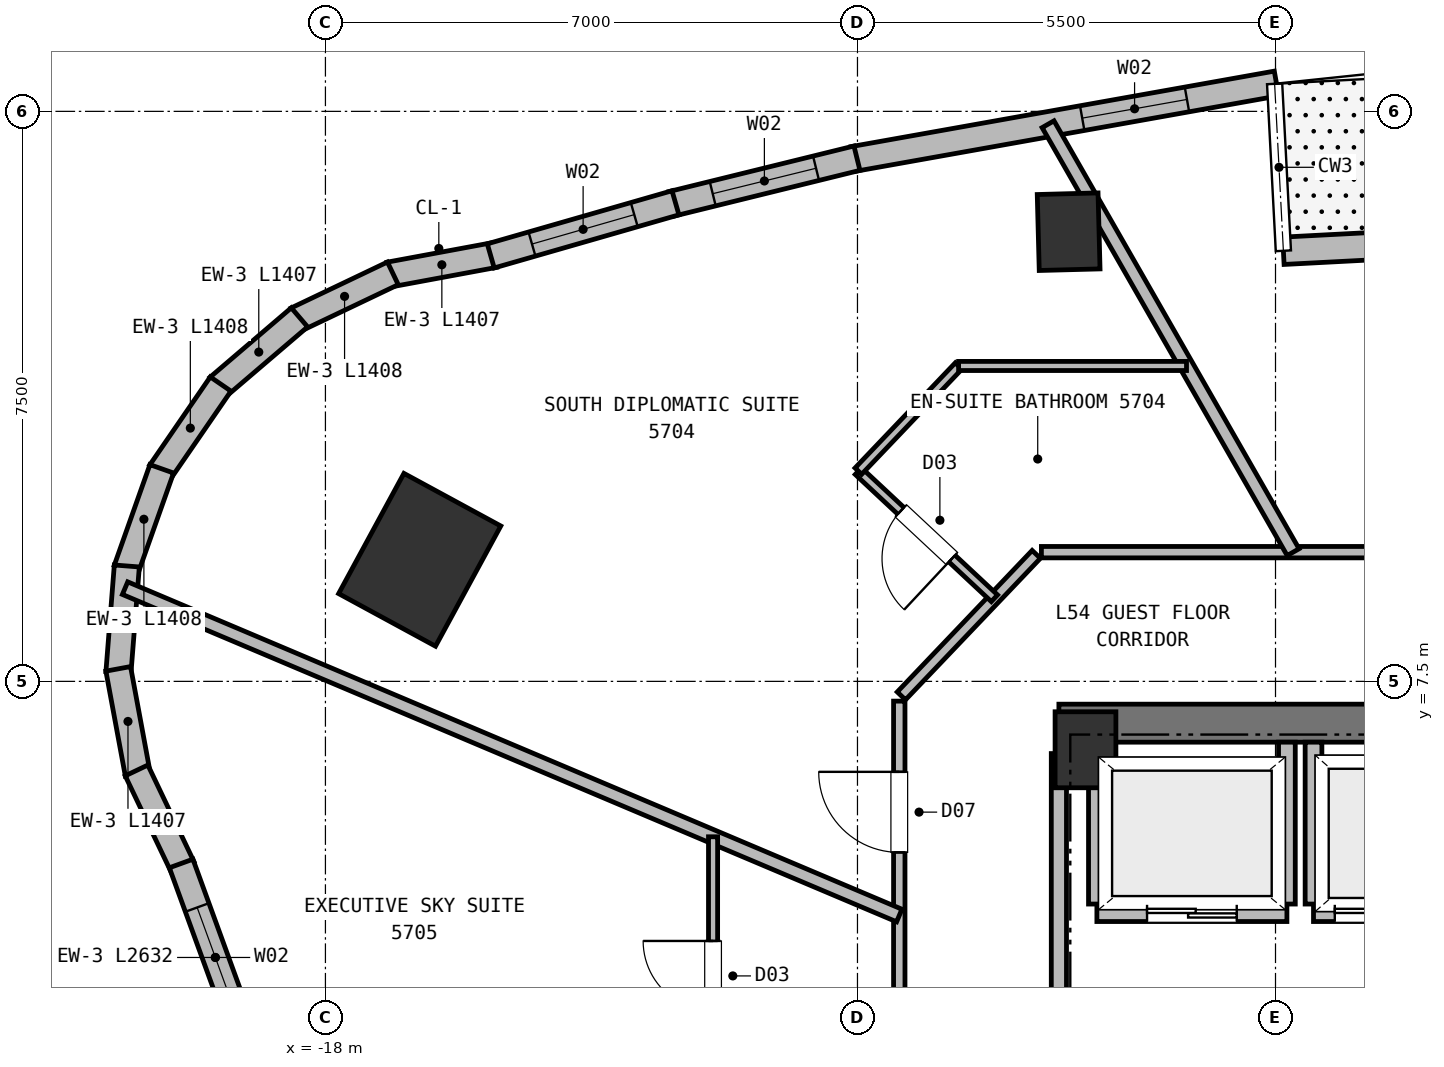
"""IFC4 building model, lengths in metres.
Left out: names, types, materials, properties, quantities, classifications, styles, units other than length and angle.
Written with IfcOpenShell. Run it as: python <this file> out.ifc"""

import sys

from ifc_helpers import new_model, si_unit, direction, frame, frame_2d, origin, origin_2d, place, context, subcontext, project, spatial, rectangle, extrude, element, fill, save


model = new_model("IFC4")
c1 = context("Model", 3, precision=1e-05, world=origin(), true_north=direction((0.0, 1.0)))
c2 = subcontext(c1, "Body", "Model", "MODEL_VIEW")
j1 = project(units=[si_unit("LENGTHUNIT", "METRE"), si_unit("PLANEANGLEUNIT", "RADIAN")], contexts=[c1])
p1 = place(None, origin())
s1 = spatial("IfcSite", under=j1, at=p1, CompositionType="ELEMENT")
p2 = place(p1, origin())
s2 = spatial("IfcBuilding", under=s1, at=p2, CompositionType="ELEMENT")
p3 = place(p2, frame((0.0, 0.0, 216.95)))
s3 = spatial("IfcBuildingStorey", under=s2, at=p3, CompositionType="ELEMENT", Elevation=216.95)
p4 = place(p3, frame((-8.0, 6.6, 0.0), z_axis=(0.0, 0.0, 1.0), x_axis=(1.0, 0.0, 0.0)))
e1 = element("IfcColumn", 1, at=p4, inside=s3, PredefinedType="COLUMN", context=c2, shape_type="SweptSolid", body=[
    extrude(rectangle(XDim=0.8, YDim=1.0, at=origin_2d()), origin(), (0.0, 0.0, 1.0), 3.8),
])
p5 = place(p3, frame((-8.35, 6.95, 0.0), z_axis=(0.0, 0.0, 1.0), x_axis=(1.0, 0.0, 0.0)))
e2 = element("IfcWall", 2, at=p5, inside=s3, PredefinedType="SHEAR", context=c2, shape_type="SweptSolid", body=[
    extrude(rectangle(XDim=16.7, YDim=0.5, at=frame_2d((8.35, 0.0))), origin(), (0.0, 0.0, 1.0), 3.55),
])
p6 = place(p3, frame((-16.76, 9.1, 0.0), z_axis=(0.0, 0.0, 1.0), x_axis=(-0.878817112662, 0.47715876026, 0.0)))
e3 = element("IfcColumn", 3, at=p6, inside=s3, PredefinedType="COLUMN", context=c2, shape_type="SweptSolid", body=[
    extrude(rectangle(XDim=1.45, YDim=1.8, at=origin_2d()), origin(), (0.0, 0.0, 1.0), 3.8),
])
p7 = place(p3, frame((-8.222, 13.417, 0.0), z_axis=(0.0, 0.0, 1.0), x_axis=(0.999657324976, 0.026176948308, 0.0)))
e4 = element("IfcColumn", 4, at=p7, inside=s3, PredefinedType="COLUMN", context=c2, shape_type="SweptSolid", body=[
    extrude(rectangle(XDim=0.8, YDim=1.0, at=origin_2d()), origin(), (0.0, 0.0, 1.0), 3.8),
])
p8 = place(p3, frame((-5.396, 13.166, 0.0), z_axis=(0.0, 0.0, 1.0), x_axis=(0.998629642142, 0.052333907124, 0.0)))
e5 = element("IfcWall", 5, at=p8, inside=s3, PredefinedType="SOLIDWALL", context=c2, shape_type="SweptSolid", body=[
    extrude(rectangle(XDim=9.4, YDim=0.36, at=frame_2d((4.7, 0.0))), origin(), (0.0, 0.0, 1.0), 3.55),
])
p9 = place(p8, frame((2.2, 0.0, 0.0)))
e6 = element("IfcOpeningElement", 6, at=p9, cuts=e5, PredefinedType="OPENING", context=c2, shape_type="SweptSolid", body=[
    extrude(rectangle(XDim=1.65, YDim=2.25, at=frame_2d((0.825, 1.125))), frame((0.0, 0.19, 0.0), z_axis=(0.0, -1.0, 0.0), x_axis=(1.0, 0.0, 0.0)), (0.0, 0.0, 1.0), 0.38),
])
p10 = place(p3, frame((-17.16, 12.853, 0.0), z_axis=(0.0, 0.0, 1.0), x_axis=(0.983270499209, 0.182151380411, 0.0)))
e7 = element("IfcWall", 7, at=p10, inside=s3, PredefinedType="SOLIDWALL", context=c2, shape_type="SweptSolid", body=[
    extrude(rectangle(XDim=1.407, YDim=0.33, at=frame_2d((0.704, 0.0))), origin(), (0.0, 0.0, 1.0), 3.55),
])
for number, where, z_axis, x_axis in (
    (8, (-18.383, 12.263, 0.0), (0.0, 0.0, 1.0), (0.903, 0.431, 0.0)),
    (9, (-19.412, 11.375, 0.0), (0.0, 0.0, 1.0), (0.76, 0.649, 0.0)),
    (10, (-20.176, 10.252, 0.0), (0.0, 0.0, 1.0), (0.566, 0.824, 0.0)),
):
    element("IfcWall", number, at=place(p3, frame(where, z_axis=z_axis, x_axis=x_axis)), inside=s3, PredefinedType="SOLIDWALL", context=c2, shape_type="SweptSolid", body=[
        extrude(rectangle(XDim=1.407, YDim=0.33, at=frame_2d((0.704, 0.0))), origin(), (0.0, 0.0, 1.0), 3.55),
    ])
p11 = place(p3, frame((-20.623, 8.97, 0.0), z_axis=(0.0, 0.0, 1.0), x_axis=(0.333709077945, 0.942676111555, 0.0)))
e11 = element("IfcWall", 11, at=p11, inside=s3, PredefinedType="SOLIDWALL", context=c2, shape_type="SweptSolid", body=[
    extrude(rectangle(XDim=1.408, YDim=0.33, at=frame_2d((0.704, 0.0))), origin(), (0.0, 0.0, 1.0), 3.55),
])
p12 = place(p3, frame((-20.724, 7.615, 0.0), z_axis=(0.0, 0.0, 1.0), x_axis=(0.07857999626, 0.996907811278, 0.0)))
e12 = element("IfcWall", 12, at=p12, inside=s3, PredefinedType="SOLIDWALL", context=c2, shape_type="SweptSolid", body=[
    extrude(rectangle(XDim=1.407, YDim=0.33, at=frame_2d((0.704, 0.0))), origin(), (0.0, 0.0, 1.0), 3.55),
])
p13 = place(p3, frame((-20.469, 6.281, 0.0), z_axis=(0.0, 0.0, 1.0), x_axis=(-0.182455673353, 0.983214080077, 0.0)))
e13 = element("IfcWall", 13, at=p13, inside=s3, PredefinedType="SOLIDWALL", context=c2, shape_type="SweptSolid", body=[
    extrude(rectangle(XDim=1.408, YDim=0.33, at=frame_2d((0.704, 0.0))), origin(), (0.0, 0.0, 1.0), 3.55),
])
p14 = place(p3, frame((-19.879, 5.058, 0.0), z_axis=(0.0, 0.0, 1.0), x_axis=(-0.430694266873, 0.902497893894, 0.0)))
e14 = element("IfcWall", 14, at=p14, inside=s3, PredefinedType="SOLIDWALL", context=c2, shape_type="SweptSolid", body=[
    extrude(rectangle(XDim=1.407, YDim=0.33, at=frame_2d((0.704, 0.0))), origin(), (0.0, 0.0, 1.0), 3.55),
])
p15 = place(p3, frame((-18.998, 2.631, 0.0), z_axis=(0.0, 0.0, 1.0), x_axis=(-0.342100538488, 0.939663355445, 0.0)))
e15 = element("IfcWall", 15, at=p15, inside=s3, PredefinedType="SOLIDWALL", context=c2, shape_type="SweptSolid", body=[
    extrude(rectangle(XDim=2.632, YDim=0.33, at=frame_2d((1.316, 0.0))), origin(), (0.0, 0.0, 1.0), 3.55),
])
p16 = place(p15, frame((0.616, 0.0, 0.72)))
e16 = element("IfcOpeningElement", 16, at=p16, cuts=e15, PredefinedType="OPENING", context=c2, shape_type="SweptSolid", body=[
    extrude(rectangle(XDim=1.4, YDim=1.84, at=frame_2d((0.7, 0.92))), frame((0.0, 0.175, 0.0), z_axis=(0.0, -1.0, 0.0), x_axis=(1.0, 0.0, 0.0)), (0.0, 0.0, 1.0), 0.35),
])
p17 = place(p3, frame((-11.056, 14.374, 0.0), z_axis=(0.0, 0.0, 1.0), x_axis=(0.984457704332, 0.17562183344, 0.0)))
e17 = element("IfcWall", 17, at=p17, inside=s3, PredefinedType="SOLIDWALL", context=c2, shape_type="SweptSolid", body=[
    extrude(rectangle(XDim=5.656, YDim=0.33, at=frame_2d((2.828, 0.0))), origin(), (0.0, 0.0, 1.0), 3.55),
])
p18 = place(p17, frame((3.06, 0.0, 0.72)))
e18 = element("IfcOpeningElement", 18, at=p18, cuts=e17, PredefinedType="OPENING", context=c2, shape_type="SweptSolid", body=[
    extrude(rectangle(XDim=1.4, YDim=1.88, at=frame_2d((0.7, 0.94))), frame((0.0, 0.175, 0.0), z_axis=(0.0, -1.0, 0.0), x_axis=(1.0, 0.0, 0.0)), (0.0, 0.0, 1.0), 0.35),
])
p19 = place(p3, frame((-13.443, 13.784, 0.0), z_axis=(0.0, 0.0, 1.0), x_axis=(0.970995069754, 0.239099507555, 0.0)))
e19 = element("IfcWall", 19, at=p19, inside=s3, PredefinedType="SOLIDWALL", context=c2, shape_type="SweptSolid", body=[
    extrude(rectangle(XDim=2.509, YDim=0.33, at=frame_2d((1.254, 0.0))), origin(), (0.0, 0.0, 1.0), 3.55),
])
p20 = place(p19, frame((0.554, 0.0, 0.72)))
e20 = element("IfcOpeningElement", 20, at=p20, cuts=e19, PredefinedType="OPENING", context=c2, shape_type="SweptSolid", body=[
    extrude(rectangle(XDim=1.4, YDim=1.84, at=frame_2d((0.7, 0.92))), frame((0.0, 0.175, 0.0), z_axis=(0.0, -1.0, 0.0), x_axis=(1.0, 0.0, 0.0)), (0.0, 0.0, 1.0), 0.35),
])
p21 = place(p3, frame((-15.825, 13.098, 0.0), z_axis=(0.0, 0.0, 1.0), x_axis=(0.961045266568, 0.276391019406, 0.0)))
e21 = element("IfcWall", 21, at=p21, inside=s3, PredefinedType="SOLIDWALL", context=c2, shape_type="SweptSolid", body=[
    extrude(rectangle(XDim=2.529, YDim=0.33, at=frame_2d((1.265, 0.0))), origin(), (0.0, 0.0, 1.0), 3.55),
])
p22 = place(p21, frame((0.564, 0.0, 0.72)))
e22 = element("IfcOpeningElement", 22, at=p22, cuts=e21, PredefinedType="OPENING", context=c2, shape_type="SweptSolid", body=[
    extrude(rectangle(XDim=1.4, YDim=1.84, at=frame_2d((0.7, 0.92))), frame((0.0, 0.175, 0.0), z_axis=(0.0, -1.0, 0.0), x_axis=(1.0, 0.0, 0.0)), (0.0, 0.0, 1.0), 0.35),
])
p23 = place(p3, frame((-7.85, 4.45, 0.0), z_axis=(0.0, 0.0, 1.0), x_axis=(1.0, 0.0, 0.0)))
e23 = element("IfcWall", 23, at=p23, inside=s3, PredefinedType="PARTITIONING", context=c2, shape_type="SweptSolid", body=[
    extrude(rectangle(XDim=2.5, YDim=0.22, at=frame_2d((1.25, 0.0))), origin(), (0.0, 0.0, 1.0), 3.55),
])
p24 = place(p23, frame((0.66, 0.0, 0.0)))
e24 = element("IfcOpeningElement", 24, at=p24, cuts=e23, PredefinedType="OPENING", context=c2, shape_type="SweptSolid", body=[
    extrude(rectangle(XDim=1.18, YDim=2.15, at=frame_2d((0.59, 1.075))), frame((0.0, 0.12, 0.0), z_axis=(0.0, -1.0, 0.0), x_axis=(1.0, 0.0, 0.0)), (0.0, 0.0, 1.0), 0.24),
])
p25 = place(p3, frame((-7.85, 4.57, 0.0), z_axis=(0.0, 0.0, 1.0), x_axis=(0.0, 1.0, 0.0)))
e25 = element("IfcWall", 25, at=p25, inside=s3, PredefinedType="PARTITIONING", context=c2, shape_type="SweptSolid", body=[
    extrude(rectangle(XDim=2.13, YDim=0.22, at=frame_2d((1.065, 0.0))), origin(), (0.0, 0.0, 1.0), 3.18),
])
p26 = place(p3, frame((-5.35, 4.57, 0.0), z_axis=(0.0, 0.0, 1.0), x_axis=(0.0, 1.0, 0.0)))
e26 = element("IfcWall", 26, at=p26, inside=s3, PredefinedType="PARTITIONING", context=c2, shape_type="SweptSolid", body=[
    extrude(rectangle(XDim=2.13, YDim=0.22, at=frame_2d((1.065, 0.0))), origin(), (0.0, 0.0, 1.0), 3.55),
])
p27 = place(p3, frame((-5.0, 4.45, 0.0), z_axis=(0.0, 0.0, 1.0), x_axis=(1.0, 0.0, 0.0)))
e27 = element("IfcWall", 27, at=p27, inside=s3, PredefinedType="PARTITIONING", context=c2, shape_type="SweptSolid", body=[
    extrude(rectangle(XDim=2.4, YDim=0.22, at=frame_2d((1.2, 0.0))), origin(), (0.0, 0.0, 1.0), 3.55),
])
p28 = place(p27, frame((0.28, 0.0, 0.0)))
e28 = element("IfcOpeningElement", 28, at=p28, cuts=e27, PredefinedType="OPENING", context=c2, shape_type="SweptSolid", body=[
    extrude(rectangle(XDim=1.22, YDim=2.15, at=frame_2d((0.61, 1.075))), frame((0.0, 0.12, 0.0), z_axis=(0.0, -1.0, 0.0), x_axis=(1.0, 0.0, 0.0)), (0.0, 0.0, 1.0), 0.24),
])
p29 = place(p3, frame((-5.0, 4.57, 0.0), z_axis=(0.0, 0.0, 1.0), x_axis=(0.0, 1.0, 0.0)))
e29 = element("IfcWall", 29, at=p29, inside=s3, PredefinedType="PARTITIONING", context=c2, shape_type="SweptSolid", body=[
    extrude(rectangle(XDim=2.13, YDim=0.22, at=frame_2d((1.065, 0.0))), origin(), (0.0, 0.0, 1.0), 3.55),
])
p30 = place(p3, frame((-8.35, 1.15, 0.0), z_axis=(0.0, 0.0, 1.0), x_axis=(0.0, 1.0, 0.0)))
e30 = element("IfcWall", 30, at=p30, inside=s3, PredefinedType="PARTITIONING", context=c2, shape_type="SweptSolid", body=[
    extrude(rectangle(XDim=5.4, YDim=0.2, at=frame_2d((2.7, 0.0))), origin(), (0.0, 0.0, 1.0), 3.55),
])
p31 = place(p30, frame((0.95, 0.0, 0.0)))
e31 = element("IfcOpeningElement", 31, at=p31, cuts=e30, PredefinedType="OPENING", context=c2, shape_type="SweptSolid", body=[
    extrude(rectangle(XDim=1.15, YDim=2.15, at=frame_2d((0.575, 1.075))), frame((0.0, 0.11, 0.0), z_axis=(0.0, -1.0, 0.0), x_axis=(1.0, 0.0, 0.0)), (0.0, 0.0, 1.0), 0.22),
])
p32 = place(p3, frame((-8.58, 9.2, 0.0), z_axis=(0.0, 0.0, 1.0), x_axis=(1.0, 0.0, 0.0)))
e32 = element("IfcWall", 32, at=p32, inside=s3, PredefinedType="PARTITIONING", context=c2, shape_type="SweptSolid", body=[
    extrude(rectangle(XDim=17.16, YDim=0.15, at=frame_2d((8.58, 0.0))), origin(), (0.0, 0.0, 1.0), 3.55),
])
p33 = place(p32, frame((7.52, 0.0, 0.0)))
e33 = element("IfcOpeningElement", 33, at=p33, cuts=e32, PredefinedType="OPENING", context=c2, shape_type="SweptSolid", body=[
    extrude(rectangle(XDim=1.0, YDim=2.15, at=frame_2d((0.5, 1.075))), frame((0.0, 0.085, 0.0), z_axis=(0.0, -1.0, 0.0), x_axis=(1.0, 0.0, 0.0)), (0.0, 0.0, 1.0), 0.17),
])
p34 = place(p32, frame((14.319, 0.0, 0.0)))
e34 = element("IfcOpeningElement", 34, at=p34, cuts=e32, PredefinedType="OPENING", context=c2, shape_type="SweptSolid", body=[
    extrude(rectangle(XDim=1.06, YDim=2.15, at=frame_2d((0.53, 1.075))), frame((0.0, 0.085, 0.0), z_axis=(0.0, -1.0, 0.0), x_axis=(1.0, 0.0, 0.0)), (0.0, 0.0, 1.0), 0.17),
])
p35 = place(p3, frame((-10.422, 7.309, 0.0), z_axis=(0.0, 0.0, 1.0), x_axis=(0.689960858356, 0.723846678473, 0.0)))
e35 = element("IfcWall", 35, at=p35, inside=s3, PredefinedType="PARTITIONING", context=c2, shape_type="SweptSolid", body=[
    extrude(rectangle(XDim=2.572, YDim=0.15, at=frame_2d((1.286, 0.0))), origin(), (0.0, 0.0, 1.0), 3.55),
])
p36 = place(p3, frame((-10.45, -7.24, 0.0), z_axis=(0.0, 0.0, 1.0), x_axis=(0.0, 1.0, 0.0)))
e36 = element("IfcWall", 36, at=p36, inside=s3, PredefinedType="PARTITIONING", context=c2, shape_type="SweptSolid", body=[
    extrude(rectangle(XDim=14.48, YDim=0.15, at=frame_2d((7.24, 0.0))), origin(), (0.0, 0.0, 1.0), 3.23),
])
p37 = place(p36, frame((0.909, 0.0, 0.0)))
e37 = element("IfcOpeningElement", 37, at=p37, cuts=e36, PredefinedType="OPENING", context=c2, shape_type="SweptSolid", body=[
    extrude(rectangle(XDim=1.0, YDim=2.15, at=frame_2d((0.5, 1.075))), frame((0.0, 0.085, 0.0), z_axis=(0.0, -1.0, 0.0), x_axis=(1.0, 0.0, 0.0)), (0.0, 0.0, 1.0), 0.17),
])
p38 = place(p36, frame((6.593, 0.0, 0.0)))
e38 = element("IfcOpeningElement", 38, at=p38, cuts=e36, PredefinedType="OPENING", context=c2, shape_type="SweptSolid", body=[
    extrude(rectangle(XDim=1.06, YDim=2.15, at=frame_2d((0.53, 1.075))), frame((0.0, 0.085, 0.0), z_axis=(0.0, -1.0, 0.0), x_axis=(1.0, 0.0, 0.0)), (0.0, 0.0, 1.0), 0.17),
])
p39 = place(p36, frame((12.49, 0.0, 0.0)))
e39 = element("IfcOpeningElement", 39, at=p39, cuts=e36, PredefinedType="OPENING", context=c2, shape_type="SweptSolid", body=[
    extrude(rectangle(XDim=1.06, YDim=2.15, at=frame_2d((0.53, 1.075))), frame((0.0, 0.085, 0.0), z_axis=(0.0, -1.0, 0.0), x_axis=(1.0, 0.0, 0.0)), (0.0, 0.0, 1.0), 0.17),
])
p40 = place(p3, frame((-5.268, 9.2, 0.0), z_axis=(0.0, 0.0, 1.0), x_axis=(-0.496920769896, 0.867795914052, 0.0)))
e40 = element("IfcWall", 40, at=p40, inside=s3, PredefinedType="PARTITIONING", context=c2, shape_type="SweptSolid", body=[
    extrude(rectangle(XDim=6.489, YDim=0.18, at=frame_2d((3.244, 0.0))), origin(), (0.0, 0.0, 1.0), 3.55),
])
p41 = place(p3, frame((-9.198, 8.594, 0.0), z_axis=(0.0, 0.0, 1.0), x_axis=(-0.730664159642, 0.682737054666, 0.0)))
e41 = element("IfcWall", 41, at=p41, inside=s3, PredefinedType="PARTITIONING", context=c2, shape_type="SweptSolid", body=[
    extrude(rectangle(XDim=2.45, YDim=0.12, at=frame_2d((1.225, 0.0))), origin(), (0.0, 0.0, 1.0), 3.55),
])
p42 = place(p41, frame((0.765, 0.0, 0.0)))
e42 = element("IfcOpeningElement", 42, at=p42, cuts=e41, PredefinedType="OPENING", context=c2, shape_type="SweptSolid", body=[
    extrude(rectangle(XDim=0.92, YDim=2.1, at=frame_2d((0.46, 1.05))), frame((0.0, 0.07, 0.0), z_axis=(0.0, -1.0, 0.0), x_axis=(1.0, 0.0, 0.0)), (0.0, 0.0, 1.0), 0.14),
])
p43 = place(p3, frame((-10.988, 10.266, 0.0), z_axis=(0.0, 0.0, 1.0), x_axis=(0.689980418995, 0.723828033033, 0.0)))
e43 = element("IfcWall", 43, at=p43, inside=s3, PredefinedType="PARTITIONING", context=c2, shape_type="SweptSolid", body=[
    extrude(rectangle(XDim=1.911, YDim=0.12, at=frame_2d((0.956, 0.0))), origin(), (0.0, 0.0, 1.0), 3.55),
])
p44 = place(p3, frame((-6.671, 11.65, 0.0), z_axis=(0.0, 0.0, 1.0), x_axis=(-1.0, 0.0, 0.0)))
e44 = element("IfcWall", 44, at=p44, inside=s3, PredefinedType="PARTITIONING", context=c2, shape_type="SweptSolid", body=[
    extrude(rectangle(XDim=2.999, YDim=0.12, at=frame_2d((1.499, 0.0))), origin(), (0.0, 0.0, 1.0), 3.55),
])
p45 = place(p3, frame((-10.45, 4.419, 0.0), z_axis=(0.0, 0.0, 1.0), x_axis=(-0.921035485522, 0.389478670032, 0.0)))
e45 = element("IfcWall", 45, at=p45, inside=s3, PredefinedType="PARTITIONING", context=c2, shape_type="SweptSolid", body=[
    extrude(rectangle(XDim=11.059, YDim=0.18, at=frame_2d((5.53, 0.0))), origin(), (0.0, 0.0, 1.0), 3.55),
])
p46 = place(p3, frame((-12.9, 1.794, 0.0), z_axis=(0.0, 0.0, 1.0), x_axis=(0.0, 1.0, 0.0)))
e46 = element("IfcWall", 46, at=p46, inside=s3, PredefinedType="PARTITIONING", context=c2, shape_type="SweptSolid", body=[
    extrude(rectangle(XDim=3.661, YDim=0.12, at=frame_2d((1.831, 0.0))), origin(), (0.0, 0.0, 1.0), 3.55),
])
p47 = place(p46, frame((1.371, 0.0, 0.0)))
e47 = element("IfcOpeningElement", 47, at=p47, cuts=e46, PredefinedType="OPENING", context=c2, shape_type="SweptSolid", body=[
    extrude(rectangle(XDim=0.92, YDim=2.1, at=frame_2d((0.46, 1.05))), frame((0.0, 0.07, 0.0), z_axis=(0.0, -1.0, 0.0), x_axis=(1.0, 0.0, 0.0)), (0.0, 0.0, 1.0), 0.14),
])
p48 = place(p16, origin())
e48 = element("IfcWindow", 48, at=p48, inside=s3, PartitioningType="SINGLE_PANEL", PredefinedType="WINDOW", context=c2, shape_type="SweptSolid", body=[
    extrude(rectangle(XDim=1.4, YDim=1.84, at=frame_2d((0.7, 0.92))), frame((0.0, 0.03, 0.0), z_axis=(0.0, -1.0, 0.0), x_axis=(1.0, 0.0, 0.0)), (0.0, 0.0, 1.0), 0.06),
])
fill(e16, e48)
p49 = place(p18, origin())
e49 = element("IfcWindow", 49, at=p49, inside=s3, PartitioningType="SINGLE_PANEL", PredefinedType="WINDOW", context=c2, shape_type="SweptSolid", body=[
    extrude(rectangle(XDim=1.4, YDim=1.88, at=frame_2d((0.7, 0.94))), frame((0.0, 0.03, 0.0), z_axis=(0.0, -1.0, 0.0), x_axis=(1.0, 0.0, 0.0)), (0.0, 0.0, 1.0), 0.06),
])
fill(e18, e49)
p50 = place(p20, origin())
e50 = element("IfcWindow", 50, at=p50, inside=s3, PartitioningType="SINGLE_PANEL", PredefinedType="WINDOW", context=c2, shape_type="SweptSolid", body=[
    extrude(rectangle(XDim=1.4, YDim=1.84, at=frame_2d((0.7, 0.92))), frame((0.0, 0.03, 0.0), z_axis=(0.0, -1.0, 0.0), x_axis=(1.0, 0.0, 0.0)), (0.0, 0.0, 1.0), 0.06),
])
fill(e20, e50)
p51 = place(p22, origin())
e51 = element("IfcWindow", 51, at=p51, inside=s3, PartitioningType="SINGLE_PANEL", PredefinedType="WINDOW", context=c2, shape_type="SweptSolid", body=[
    extrude(rectangle(XDim=1.4, YDim=1.84, at=frame_2d((0.7, 0.92))), frame((0.0, 0.03, 0.0), z_axis=(0.0, -1.0, 0.0), x_axis=(1.0, 0.0, 0.0)), (0.0, 0.0, 1.0), 0.06),
])
fill(e22, e51)
p52 = place(p24, origin())
e52 = element("IfcDoor", 52, at=p52, inside=s3, OperationType="DOUBLE_DOOR_SLIDING", PredefinedType="DOOR", context=c2, shape_type="SweptSolid", body=[
    extrude(rectangle(XDim=1.18, YDim=2.15, at=frame_2d((0.59, 1.075))), frame((0.0, 0.025, 0.0), z_axis=(0.0, -1.0, 0.0), x_axis=(1.0, 0.0, 0.0)), (0.0, 0.0, 1.0), 0.05),
])
fill(e24, e52)
p53 = place(p28, origin())
e53 = element("IfcDoor", 53, at=p53, inside=s3, OperationType="DOUBLE_DOOR_SLIDING", PredefinedType="DOOR", context=c2, shape_type="SweptSolid", body=[
    extrude(rectangle(XDim=1.22, YDim=2.15, at=frame_2d((0.61, 1.075))), frame((0.0, 0.025, 0.0), z_axis=(0.0, -1.0, 0.0), x_axis=(1.0, 0.0, 0.0)), (0.0, 0.0, 1.0), 0.05),
])
fill(e28, e53)
p54 = place(p42, origin())
e54 = element("IfcDoor", 54, at=p54, inside=s3, OperationType="SINGLE_SWING_LEFT", PredefinedType="DOOR", context=c2, shape_type="SweptSolid", body=[
    extrude(rectangle(XDim=0.92, YDim=2.1, at=frame_2d((0.46, 1.05))), frame((0.0, 0.025, 0.0), z_axis=(0.0, -1.0, 0.0), x_axis=(1.0, 0.0, 0.0)), (0.0, 0.0, 1.0), 0.05),
])
fill(e42, e54)
p55 = place(p47, origin())
e55 = element("IfcDoor", 55, at=p55, inside=s3, OperationType="SINGLE_SWING_RIGHT", PredefinedType="DOOR", context=c2, shape_type="SweptSolid", body=[
    extrude(rectangle(XDim=0.92, YDim=2.1, at=frame_2d((0.46, 1.05))), frame((0.0, 0.025, 0.0), z_axis=(0.0, -1.0, 0.0), x_axis=(1.0, 0.0, 0.0)), (0.0, 0.0, 1.0), 0.05),
])
fill(e47, e55)
p56 = place(p39, origin())
e56 = element("IfcDoor", 56, at=p56, inside=s3, OperationType="SINGLE_SWING_RIGHT", PredefinedType="DOOR", context=c2, shape_type="SweptSolid", body=[
    extrude(rectangle(XDim=1.06, YDim=2.15, at=frame_2d((0.53, 1.075))), frame((0.0, 0.025, 0.0), z_axis=(0.0, -1.0, 0.0), x_axis=(1.0, 0.0, 0.0)), (0.0, 0.0, 1.0), 0.05),
])
fill(e39, e56)
save(model, sys.argv[1])
